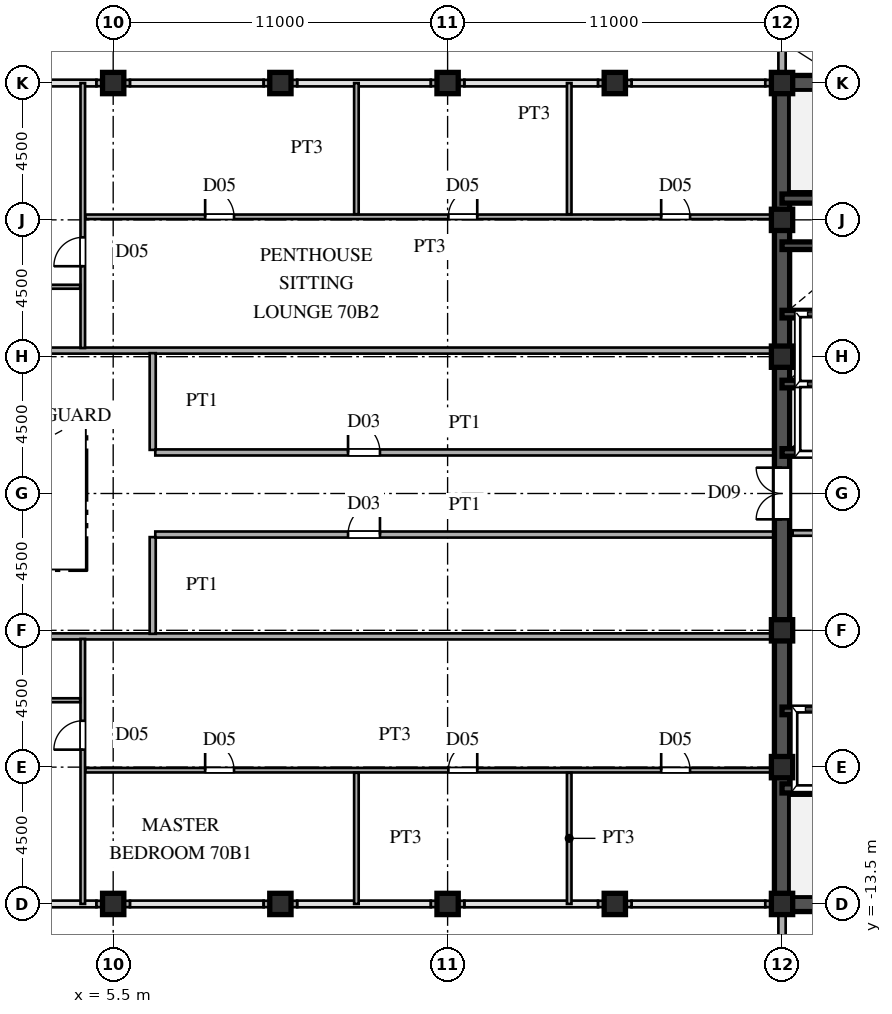
"""IFC4 building model, lengths in metres.
Left out: names, types, materials, properties, quantities, classifications, styles, units other than length and angle.
Written with IfcOpenShell. Run it as: python <this file> out.ifc"""

import sys

from ifc_helpers import new_model, si_unit, direction, frame, frame_2d, origin, origin_2d, place, context, subcontext, project, spatial, rectangle, hollow_rectangle, extrude, source, transform, mapped, element, fill, save


model = new_model("IFC4")
c1 = context("Model", 3, precision=1e-05, world=origin(), true_north=direction((0.0, 1.0)))
c2 = subcontext(c1, "Body", "Model", "MODEL_VIEW")
j1 = project(units=[si_unit("LENGTHUNIT", "METRE"), si_unit("PLANEANGLEUNIT", "RADIAN")], contexts=[c1])
p1 = place(None, origin())
s1 = spatial("IfcSite", under=j1, at=p1, CompositionType="ELEMENT")
p2 = place(p1, origin())
s2 = spatial("IfcBuilding", under=s1, at=p2, CompositionType="ELEMENT")
p3 = place(p2, frame((0.0, 0.0, 265.65)))
s3 = spatial("IfcBuildingStorey", under=s2, at=p3, CompositionType="ELEMENT", Elevation=265.65)
m1 = source(origin(), c2, "Body", "SweptSolid", [
    extrude(hollow_rectangle(XDim=0.7, YDim=0.7, WallThickness=0.03, at=origin_2d()), origin(), (0.0, 0.0, 1.0), 3.75),
])
for number, where, z_axis, x_axis in (
    (1, (27.5, -13.5, 0.0), (0.0, 0.0, 1.0), (1.0, 0.0, 0.0)),
    (2, (27.5, -9.0, 0.0), (0.0, 0.0, 1.0), (1.0, 0.0, 0.0)),
    (3, (27.5, -4.5, 0.0), (0.0, 0.0, 1.0), (1.0, 0.0, 0.0)),
    (4, (27.5, 4.5, 0.0), (0.0, 0.0, 1.0), (1.0, 0.0, 0.0)),
    (5, (27.5, 9.0, 0.0), (0.0, 0.0, 1.0), (1.0, 0.0, 0.0)),
    (6, (27.5, 13.5, 0.0), (0.0, 0.0, 1.0), (1.0, 0.0, 0.0)),
    (7, (5.5, -13.5, 0.0), (0.0, 0.0, 1.0), (1.0, 0.0, 0.0)),
    (8, (5.5, 13.5, 0.0), (0.0, 0.0, 1.0), (1.0, 0.0, 0.0)),
    (9, (11.0, -13.5, 0.0), (0.0, 0.0, 1.0), (1.0, 0.0, 0.0)),
    (10, (11.0, 13.5, 0.0), (0.0, 0.0, 1.0), (1.0, 0.0, 0.0)),
    (11, (16.5, -13.5, 0.0), (0.0, 0.0, 1.0), (1.0, 0.0, 0.0)),
    (12, (16.5, 13.5, 0.0), (0.0, 0.0, 1.0), (1.0, 0.0, 0.0)),
    (13, (22.0, -13.5, 0.0), (0.0, 0.0, 1.0), (1.0, 0.0, 0.0)),
    (14, (22.0, 13.5, 0.0), (0.0, 0.0, 1.0), (1.0, 0.0, 0.0)),
):
    element("IfcColumn", number, at=place(p3, frame(where, z_axis=z_axis, x_axis=x_axis)), inside=s3, PredefinedType="COLUMN", context=c2, shape_type="MappedRepresentation", body=[
        mapped(m1, transform((0.0, 0.0, 0.0), scale=1.0)),
    ])
p4 = place(p3, frame((27.5, -15.98, 0.0), z_axis=(0.0, 0.0, 1.0), x_axis=(0.0, 1.0, 0.0)))
e15 = element("IfcWall", 15, at=p4, inside=s3, PredefinedType="SOLIDWALL", context=c2, shape_type="SweptSolid", body=[
    extrude(rectangle(XDim=1.605, YDim=0.24, at=frame_2d((0.803, 0.0))), origin(), (0.0, 0.0, 1.0), 3.49),
])
for number, where, z_axis, x_axis in (
    (16, (27.5, -14.375, 0.0), (0.0, 0.0, 1.0), (0.0, 1.0, 0.0)),
    (17, (27.5, 13.755, 0.0), (0.0, 0.0, 1.0), (0.0, 1.0, 0.0)),
):
    element("IfcWall", number, at=place(p3, frame(where, z_axis=z_axis, x_axis=x_axis)), inside=s3, PredefinedType="SOLIDWALL", context=c2, shape_type="SweptSolid", body=[
        extrude(rectangle(XDim=0.62, YDim=0.24, at=frame_2d((0.31, 0.0))), origin(), (0.0, 0.0, 1.0), 2.99),
    ])
p5 = place(p3, frame((27.5, 14.375, 0.0), z_axis=(0.0, 0.0, 1.0), x_axis=(0.0, 1.0, 0.0)))
e18 = element("IfcWall", 18, at=p5, inside=s3, PredefinedType="SOLIDWALL", context=c2, shape_type="SweptSolid", body=[
    extrude(rectangle(XDim=1.605, YDim=0.24, at=frame_2d((0.803, 0.0))), origin(), (0.0, 0.0, 1.0), 3.49),
])
for number, where, z_axis, x_axis in (
    (19, (4.95, -13.5, 0.0), (0.0, 0.0, 1.0), (1.0, 0.0, 0.0)),
    (20, (4.95, 13.5, 0.0), (0.0, 0.0, 1.0), (1.0, 0.0, 0.0)),
    (21, (10.45, -13.5, 0.0), (0.0, 0.0, 1.0), (1.0, 0.0, 0.0)),
    (22, (10.45, 13.5, 0.0), (0.0, 0.0, 1.0), (1.0, 0.0, 0.0)),
    (23, (15.95, -13.5, 0.0), (0.0, 0.0, 1.0), (1.0, 0.0, 0.0)),
    (24, (15.95, 13.5, 0.0), (0.0, 0.0, 1.0), (1.0, 0.0, 0.0)),
    (25, (21.45, -13.5, 0.0), (0.0, 0.0, 1.0), (1.0, 0.0, 0.0)),
    (26, (21.45, 13.5, 0.0), (0.0, 0.0, 1.0), (1.0, 0.0, 0.0)),
):
    element("IfcWall", number, at=place(p3, frame(where, z_axis=z_axis, x_axis=x_axis)), inside=s3, PredefinedType="SOLIDWALL", context=c2, shape_type="SweptSolid", body=[
        extrude(rectangle(XDim=1.1, YDim=0.21, at=frame_2d((0.55, 0.0))), origin(), (0.0, 0.0, 1.0), 2.99),
    ])
for number, where, z_axis, x_axis in (
    (27, (26.95, -13.5, 0.0), (0.0, 0.0, 1.0), (1.0, 0.0, 0.0)),
    (28, (26.95, 13.5, 0.0), (0.0, 0.0, 1.0), (1.0, 0.0, 0.0)),
):
    element("IfcWall", number, at=place(p3, frame(where, z_axis=z_axis, x_axis=x_axis)), inside=s3, PredefinedType="SOLIDWALL", context=c2, shape_type="SweptSolid", body=[
        extrude(rectangle(XDim=0.54, YDim=0.21, at=frame_2d((0.27, 0.0))), origin(), (0.0, 0.0, 1.0), 2.99),
    ])
for number, where, z_axis, x_axis in (
    (29, (27.5, -13.5, 0.0), (0.0, 0.0, 1.0), (0.0, 1.0, 0.0)),
    (30, (27.5, 1.3, 0.0), (0.0, 0.0, 1.0), (0.0, 1.0, 0.0)),
):
    element("IfcWall", number, at=place(p3, frame(where, z_axis=z_axis, x_axis=x_axis)), inside=s3, PredefinedType="SHEAR", context=c2, shape_type="SweptSolid", body=[
        extrude(rectangle(XDim=12.2, YDim=0.5, at=frame_2d((6.1, 0.0))), origin(), (0.0, 0.0, 1.0), 3.49),
    ])
p6 = place(p3, frame((27.5, -1.3, 0.0), z_axis=(0.0, 0.0, 1.0), x_axis=(0.0, 1.0, 0.0)))
e31 = element("IfcWall", 31, at=p6, inside=s3, PredefinedType="SHEAR", context=c2, shape_type="SweptSolid", body=[
    extrude(rectangle(XDim=2.6, YDim=0.5, at=frame_2d((1.3, 0.0))), origin(), (0.0, 0.0, 1.0), 3.49),
])
p7 = place(p6, frame((0.45, 0.0, 0.0)))
e32 = element("IfcOpeningElement", 32, at=p7, cuts=e31, PredefinedType="OPENING", context=c2, shape_type="SweptSolid", body=[
    extrude(rectangle(XDim=1.7, YDim=2.35, at=frame_2d((0.85, 1.175))), frame((0.0, 0.26, 0.0), z_axis=(0.0, -1.0, 0.0), x_axis=(1.0, 0.0, 0.0)), (0.0, 0.0, 1.0), 0.52),
])
for number, where, z_axis, x_axis in (
    (33, (27.5, -13.5, 0.0), (0.0, 0.0, 1.0), (1.0, 0.0, 0.0)),
    (34, (27.5, 13.5, 0.0), (0.0, 0.0, 1.0), (1.0, 0.0, 0.0)),
):
    element("IfcWall", number, at=place(p3, frame(where, z_axis=z_axis, x_axis=x_axis)), inside=s3, PredefinedType="SHEAR", context=c2, shape_type="SweptSolid", body=[
        extrude(rectangle(XDim=9.0, YDim=0.5, at=frame_2d((4.5, 0.0))), origin(), (0.0, 0.0, 1.0), 3.49),
    ])
p8 = place(p3, frame((27.5, -9.7, 0.0), z_axis=(0.0, 0.0, 1.0), x_axis=(1.0, 0.0, 0.0)))
e35 = element("IfcWall", 35, at=p8, inside=s3, PredefinedType="SHEAR", context=c2, shape_type="SweptSolid", body=[
    extrude(rectangle(XDim=9.0, YDim=0.3, at=frame_2d((4.5, 0.0))), origin(), (0.0, 0.0, 1.0), 3.49),
])
p9 = place(p8, frame((7.3, 0.0, 0.0)))
e36 = element("IfcOpeningElement", 36, at=p9, cuts=e35, PredefinedType="OPENING", context=c2, shape_type="SweptSolid", body=[
    extrude(rectangle(XDim=1.1, YDim=2.2, at=frame_2d((0.55, 1.1))), frame((0.0, 0.16, 0.0), z_axis=(0.0, -1.0, 0.0), x_axis=(1.0, 0.0, 0.0)), (0.0, 0.0, 1.0), 0.32),
])
p10 = place(p3, frame((27.5, 9.7, 0.0), z_axis=(0.0, 0.0, 1.0), x_axis=(1.0, 0.0, 0.0)))
e37 = element("IfcWall", 37, at=p10, inside=s3, PredefinedType="SHEAR", context=c2, shape_type="SweptSolid", body=[
    extrude(rectangle(XDim=9.0, YDim=0.3, at=frame_2d((4.5, 0.0))), origin(), (0.0, 0.0, 1.0), 3.49),
])
p11 = place(p10, frame((7.3, 0.0, 0.0)))
e38 = element("IfcOpeningElement", 38, at=p11, cuts=e37, PredefinedType="OPENING", context=c2, shape_type="SweptSolid", body=[
    extrude(rectangle(XDim=1.1, YDim=2.2, at=frame_2d((0.55, 1.1))), frame((0.0, 0.16, 0.0), z_axis=(0.0, -1.0, 0.0), x_axis=(1.0, 0.0, 0.0)), (0.0, 0.0, 1.0), 0.32),
])
for number, where, z_axis, x_axis in (
    (39, (27.5, -7.15, 0.0), (0.0, 0.0, 1.0), (1.0, 0.0, 0.0)),
    (40, (27.5, 1.35, 0.0), (0.0, 0.0, 1.0), (1.0, 0.0, 0.0)),
    (41, (27.5, 3.6, 0.0), (0.0, 0.0, 1.0), (1.0, 0.0, 0.0)),
    (42, (27.5, 5.9, 0.0), (0.0, 0.0, 1.0), (1.0, 0.0, 0.0)),
    (43, (27.5, 8.15, 0.0), (0.0, 0.0, 1.0), (1.0, 0.0, 0.0)),
):
    element("IfcWall", number, at=place(p3, frame(where, z_axis=z_axis, x_axis=x_axis)), inside=s3, PredefinedType="SHEAR", context=c2, shape_type="SweptSolid", body=[
        extrude(rectangle(XDim=2.8, YDim=0.25, at=frame_2d((1.4, 0.0))), origin(), (0.0, 0.0, 1.0), 3.49),
    ])
p12 = place(p3, frame((27.85, -1.3, 0.0), z_axis=(0.0, 0.0, 1.0), x_axis=(1.0, 0.0, 0.0)))
e44 = element("IfcWall", 44, at=p12, inside=s3, PredefinedType="PARTITIONING", context=c2, shape_type="SweptSolid", body=[
    extrude(rectangle(XDim=5.17, YDim=0.18, at=frame_2d((2.585, 0.0))), origin(), (0.0, 0.0, 1.0), 3.49),
])
p13 = place(p12, frame((2.01, 0.0, 0.0)))
e45 = element("IfcOpeningElement", 45, at=p13, cuts=e44, PredefinedType="OPENING", context=c2, shape_type="SweptSolid", body=[
    extrude(rectangle(XDim=1.15, YDim=2.2, at=frame_2d((0.575, 1.1))), frame((0.0, 0.1, 0.0), z_axis=(0.0, -1.0, 0.0), x_axis=(1.0, 0.0, 0.0)), (0.0, 0.0, 1.0), 0.2),
])
p14 = place(p3, frame((4.585, -9.1, 0.0), z_axis=(0.0, 0.0, 1.0), x_axis=(1.0, 0.0, 0.0)))
e46 = element("IfcWall", 46, at=p14, inside=s3, PredefinedType="PARTITIONING", context=c2, shape_type="SweptSolid", body=[
    extrude(rectangle(XDim=22.66, YDim=0.15, at=frame_2d((11.33, 0.0))), origin(), (0.0, 0.0, 1.0), 3.49),
])
p15 = place(p14, frame((3.94, 0.0, 0.0)))
e47 = element("IfcOpeningElement", 47, at=p15, cuts=e46, PredefinedType="OPENING", context=c2, shape_type="SweptSolid", body=[
    extrude(rectangle(XDim=0.95, YDim=2.15, at=frame_2d((0.475, 1.075))), frame((0.0, 0.085, 0.0), z_axis=(0.0, -1.0, 0.0), x_axis=(1.0, 0.0, 0.0)), (0.0, 0.0, 1.0), 0.17),
])
p16 = place(p14, frame((11.94, 0.0, 0.0)))
e48 = element("IfcOpeningElement", 48, at=p16, cuts=e46, PredefinedType="OPENING", context=c2, shape_type="SweptSolid", body=[
    extrude(rectangle(XDim=0.95, YDim=2.15, at=frame_2d((0.475, 1.075))), frame((0.0, 0.085, 0.0), z_axis=(0.0, -1.0, 0.0), x_axis=(1.0, 0.0, 0.0)), (0.0, 0.0, 1.0), 0.17),
])
p17 = place(p14, frame((18.94, 0.0, 0.0)))
e49 = element("IfcOpeningElement", 49, at=p17, cuts=e46, PredefinedType="OPENING", context=c2, shape_type="SweptSolid", body=[
    extrude(rectangle(XDim=0.95, YDim=2.15, at=frame_2d((0.475, 1.075))), frame((0.0, 0.085, 0.0), z_axis=(0.0, -1.0, 0.0), x_axis=(1.0, 0.0, 0.0)), (0.0, 0.0, 1.0), 0.17),
])
p18 = place(p3, frame((-0.915, -6.8, 0.0), z_axis=(0.0, 0.0, 1.0), x_axis=(1.0, 0.0, 0.0)))
e50 = element("IfcWall", 50, at=p18, inside=s3, PredefinedType="PARTITIONING", context=c2, shape_type="SweptSolid", body=[
    extrude(rectangle(XDim=5.33, YDim=0.13, at=frame_2d((2.665, 0.0))), origin(), (0.0, 0.0, 1.0), 3.14),
])
p19 = place(p3, frame((-27.245, -4.7, 0.0), z_axis=(0.0, 0.0, 1.0), x_axis=(1.0, 0.0, 0.0)))
e51 = element("IfcWall", 51, at=p19, inside=s3, PredefinedType="PARTITIONING", context=c2, shape_type="SweptSolid", body=[
    extrude(rectangle(XDim=54.49, YDim=0.2, at=frame_2d((27.245, 0.0))), origin(), (0.0, 0.0, 1.0), 3.49),
])
p20 = place(p19, frame((22.47, 0.0, 0.0)))
e52 = element("IfcOpeningElement", 52, at=p20, cuts=e51, PredefinedType="OPENING", context=c2, shape_type="SweptSolid", body=[
    extrude(rectangle(XDim=1.05, YDim=2.25, at=frame_2d((0.525, 1.125))), frame((0.0, 0.11, 0.0), z_axis=(0.0, -1.0, 0.0), x_axis=(1.0, 0.0, 0.0)), (0.0, 0.0, 1.0), 0.22),
])
p21 = place(p3, frame((6.885, -1.35, 0.0), z_axis=(0.0, 0.0, 1.0), x_axis=(1.0, 0.0, 0.0)))
e53 = element("IfcWall", 53, at=p21, inside=s3, PredefinedType="PARTITIONING", context=c2, shape_type="SweptSolid", body=[
    extrude(rectangle(XDim=20.36, YDim=0.2, at=frame_2d((10.18, 0.0))), origin(), (0.0, 0.0, 1.0), 3.49),
])
p22 = place(p21, frame((6.34, 0.0, 0.0)))
e54 = element("IfcOpeningElement", 54, at=p22, cuts=e53, PredefinedType="OPENING", context=c2, shape_type="SweptSolid", body=[
    extrude(rectangle(XDim=1.05, YDim=2.25, at=frame_2d((0.525, 1.125))), frame((0.0, 0.11, 0.0), z_axis=(0.0, -1.0, 0.0), x_axis=(1.0, 0.0, 0.0)), (0.0, 0.0, 1.0), 0.22),
])
p23 = place(p3, frame((6.885, 1.35, 0.0), z_axis=(0.0, 0.0, 1.0), x_axis=(1.0, 0.0, 0.0)))
e55 = element("IfcWall", 55, at=p23, inside=s3, PredefinedType="PARTITIONING", context=c2, shape_type="SweptSolid", body=[
    extrude(rectangle(XDim=20.36, YDim=0.2, at=frame_2d((10.18, 0.0))), origin(), (0.0, 0.0, 1.0), 3.49),
])
p24 = place(p23, frame((6.34, 0.0, 0.0)))
e56 = element("IfcOpeningElement", 56, at=p24, cuts=e55, PredefinedType="OPENING", context=c2, shape_type="SweptSolid", body=[
    extrude(rectangle(XDim=1.05, YDim=2.25, at=frame_2d((0.525, 1.125))), frame((0.0, 0.11, 0.0), z_axis=(0.0, -1.0, 0.0), x_axis=(1.0, 0.0, 0.0)), (0.0, 0.0, 1.0), 0.22),
])
p25 = place(p3, frame((-27.245, 4.7, 0.0), z_axis=(0.0, 0.0, 1.0), x_axis=(1.0, 0.0, 0.0)))
e57 = element("IfcWall", 57, at=p25, inside=s3, PredefinedType="PARTITIONING", context=c2, shape_type="SweptSolid", body=[
    extrude(rectangle(XDim=54.49, YDim=0.2, at=frame_2d((27.245, 0.0))), origin(), (0.0, 0.0, 1.0), 3.49),
])
p26 = place(p25, frame((22.47, 0.0, 0.0)))
e58 = element("IfcOpeningElement", 58, at=p26, cuts=e57, PredefinedType="OPENING", context=c2, shape_type="SweptSolid", body=[
    extrude(rectangle(XDim=1.05, YDim=2.25, at=frame_2d((0.525, 1.125))), frame((0.0, 0.11, 0.0), z_axis=(0.0, -1.0, 0.0), x_axis=(1.0, 0.0, 0.0)), (0.0, 0.0, 1.0), 0.22),
])
p27 = place(p3, frame((-0.915, 6.8, 0.0), z_axis=(0.0, 0.0, 1.0), x_axis=(1.0, 0.0, 0.0)))
e59 = element("IfcWall", 59, at=p27, inside=s3, PredefinedType="PARTITIONING", context=c2, shape_type="SweptSolid", body=[
    extrude(rectangle(XDim=5.33, YDim=0.13, at=frame_2d((2.665, 0.0))), origin(), (0.0, 0.0, 1.0), 3.14),
])
p28 = place(p3, frame((4.585, 9.1, 0.0), z_axis=(0.0, 0.0, 1.0), x_axis=(1.0, 0.0, 0.0)))
e60 = element("IfcWall", 60, at=p28, inside=s3, PredefinedType="PARTITIONING", context=c2, shape_type="SweptSolid", body=[
    extrude(rectangle(XDim=22.66, YDim=0.15, at=frame_2d((11.33, 0.0))), origin(), (0.0, 0.0, 1.0), 3.49),
])
p29 = place(p28, frame((3.94, 0.0, 0.0)))
e61 = element("IfcOpeningElement", 61, at=p29, cuts=e60, PredefinedType="OPENING", context=c2, shape_type="SweptSolid", body=[
    extrude(rectangle(XDim=0.95, YDim=2.15, at=frame_2d((0.475, 1.075))), frame((0.0, 0.085, 0.0), z_axis=(0.0, -1.0, 0.0), x_axis=(1.0, 0.0, 0.0)), (0.0, 0.0, 1.0), 0.17),
])
p30 = place(p28, frame((11.94, 0.0, 0.0)))
e62 = element("IfcOpeningElement", 62, at=p30, cuts=e60, PredefinedType="OPENING", context=c2, shape_type="SweptSolid", body=[
    extrude(rectangle(XDim=0.95, YDim=2.15, at=frame_2d((0.475, 1.075))), frame((0.0, 0.085, 0.0), z_axis=(0.0, -1.0, 0.0), x_axis=(1.0, 0.0, 0.0)), (0.0, 0.0, 1.0), 0.17),
])
p31 = place(p28, frame((18.94, 0.0, 0.0)))
e63 = element("IfcOpeningElement", 63, at=p31, cuts=e60, PredefinedType="OPENING", context=c2, shape_type="SweptSolid", body=[
    extrude(rectangle(XDim=0.95, YDim=2.15, at=frame_2d((0.475, 1.075))), frame((0.0, 0.085, 0.0), z_axis=(0.0, -1.0, 0.0), x_axis=(1.0, 0.0, 0.0)), (0.0, 0.0, 1.0), 0.17),
])
p32 = place(p3, frame((4.5, -13.5, 0.0), z_axis=(0.0, 0.0, 1.0), x_axis=(0.0, 1.0, 0.0)))
e64 = element("IfcWall", 64, at=p32, inside=s3, PredefinedType="PARTITIONING", context=c2, shape_type="SweptSolid", body=[
    extrude(rectangle(XDim=8.715, YDim=0.15, at=frame_2d((4.357, 0.0))), origin(), (0.0, 0.0, 1.0), 3.49),
])
p33 = place(p32, frame((5.075, 0.0, 0.0)))
e65 = element("IfcOpeningElement", 65, at=p33, cuts=e64, PredefinedType="OPENING", context=c2, shape_type="SweptSolid", body=[
    extrude(rectangle(XDim=0.95, YDim=2.15, at=frame_2d((0.475, 1.075))), frame((0.0, 0.085, 0.0), z_axis=(0.0, -1.0, 0.0), x_axis=(1.0, 0.0, 0.0)), (0.0, 0.0, 1.0), 0.17),
])
p34 = place(p3, frame((4.5, 4.785, 0.0), z_axis=(0.0, 0.0, 1.0), x_axis=(0.0, 1.0, 0.0)))
e66 = element("IfcWall", 66, at=p34, inside=s3, PredefinedType="PARTITIONING", context=c2, shape_type="SweptSolid", body=[
    extrude(rectangle(XDim=8.715, YDim=0.15, at=frame_2d((4.357, 0.0))), origin(), (0.0, 0.0, 1.0), 3.49),
])
p35 = place(p34, frame((2.69, 0.0, 0.0)))
e67 = element("IfcOpeningElement", 67, at=p35, cuts=e66, PredefinedType="OPENING", context=c2, shape_type="SweptSolid", body=[
    extrude(rectangle(XDim=0.95, YDim=2.15, at=frame_2d((0.475, 1.075))), frame((0.0, 0.085, 0.0), z_axis=(0.0, -1.0, 0.0), x_axis=(1.0, 0.0, 0.0)), (0.0, 0.0, 1.0), 0.17),
])
for number, where, z_axis, x_axis in (
    (68, (6.8, -4.615, 0.0), (0.0, 0.0, 1.0), (0.0, 1.0, 0.0)),
    (69, (6.8, 1.435, 0.0), (0.0, 0.0, 1.0), (0.0, 1.0, 0.0)),
):
    element("IfcWall", number, at=place(p3, frame(where, z_axis=z_axis, x_axis=x_axis)), inside=s3, PredefinedType="PARTITIONING", context=c2, shape_type="SweptSolid", body=[
        extrude(rectangle(XDim=3.18, YDim=0.2, at=frame_2d((1.59, 0.0))), origin(), (0.0, 0.0, 1.0), 3.49),
    ])
for number, where, z_axis, x_axis in (
    (70, (13.5, -13.5, 0.0), (0.0, 0.0, 1.0), (0.0, 1.0, 0.0)),
    (71, (13.5, 9.185, 0.0), (0.0, 0.0, 1.0), (0.0, 1.0, 0.0)),
    (72, (20.5, -13.5, 0.0), (0.0, 0.0, 1.0), (0.0, 1.0, 0.0)),
    (73, (20.5, 9.185, 0.0), (0.0, 0.0, 1.0), (0.0, 1.0, 0.0)),
):
    element("IfcWall", number, at=place(p3, frame(where, z_axis=z_axis, x_axis=x_axis)), inside=s3, PredefinedType="PARTITIONING", context=c2, shape_type="SweptSolid", body=[
        extrude(rectangle(XDim=4.315, YDim=0.15, at=frame_2d((2.157, 0.0))), origin(), (0.0, 0.0, 1.0), 3.49),
    ])
m2 = source(origin(), c2, "Body", "SweptSolid", [
    extrude(rectangle(XDim=1.7, YDim=2.35, at=frame_2d((0.85, 1.175))), frame((0.0, 0.025, 0.0), z_axis=(0.0, -1.0, 0.0), x_axis=(1.0, 0.0, 0.0)), (0.0, 0.0, 1.0), 0.05),
])
p36 = place(p7, origin())
e74 = element("IfcDoor", 74, at=p36, inside=s3, OperationType="DOUBLE_SWING_LEFT", PredefinedType="DOOR", context=c2, shape_type="MappedRepresentation", body=[
    mapped(m2, transform((0.0, 0.0, 0.0), scale=1.0)),
])
fill(e32, e74)
m3 = source(origin(), c2, "Body", "SweptSolid", [
    extrude(rectangle(XDim=0.95, YDim=2.15, at=frame_2d((0.475, 1.075))), frame((0.0, 0.025, 0.0), z_axis=(0.0, -1.0, 0.0), x_axis=(1.0, 0.0, 0.0)), (0.0, 0.0, 1.0), 0.05),
])
p37 = place(p15, origin())
e75 = element("IfcDoor", 75, at=p37, inside=s3, OperationType="SINGLE_SWING_LEFT", PredefinedType="DOOR", context=c2, shape_type="MappedRepresentation", body=[
    mapped(m3, transform((0.0, 0.0, 0.0), scale=1.0)),
])
fill(e47, e75)
p38 = place(p16, origin())
e76 = element("IfcDoor", 76, at=p38, inside=s3, OperationType="SINGLE_SWING_RIGHT", PredefinedType="DOOR", context=c2, shape_type="MappedRepresentation", body=[
    mapped(m3, transform((0.0, 0.0, 0.0), scale=1.0)),
])
fill(e48, e76)
p39 = place(p17, origin())
e77 = element("IfcDoor", 77, at=p39, inside=s3, OperationType="SINGLE_SWING_LEFT", PredefinedType="DOOR", context=c2, shape_type="MappedRepresentation", body=[
    mapped(m3, transform((0.0, 0.0, 0.0), scale=1.0)),
])
fill(e49, e77)
m4 = source(origin(), c2, "Body", "SweptSolid", [
    extrude(rectangle(XDim=1.05, YDim=2.25, at=frame_2d((0.525, 1.125))), frame((0.0, 0.025, 0.0), z_axis=(0.0, -1.0, 0.0), x_axis=(1.0, 0.0, 0.0)), (0.0, 0.0, 1.0), 0.05),
])
p40 = place(p22, origin())
e78 = element("IfcDoor", 78, at=p40, inside=s3, OperationType="SINGLE_SWING_RIGHT", PredefinedType="DOOR", context=c2, shape_type="MappedRepresentation", body=[
    mapped(m4, transform((0.0, 0.0, 0.0), scale=1.0)),
])
fill(e54, e78)
p41 = place(p24, origin())
e79 = element("IfcDoor", 79, at=p41, inside=s3, OperationType="SINGLE_SWING_LEFT", PredefinedType="DOOR", context=c2, shape_type="MappedRepresentation", body=[
    mapped(m4, transform((0.0, 0.0, 0.0), scale=1.0)),
])
fill(e56, e79)
p42 = place(p29, origin())
e80 = element("IfcDoor", 80, at=p42, inside=s3, OperationType="SINGLE_SWING_LEFT", PredefinedType="DOOR", context=c2, shape_type="MappedRepresentation", body=[
    mapped(m3, transform((0.0, 0.0, 0.0), scale=1.0)),
])
fill(e61, e80)
p43 = place(p30, origin())
e81 = element("IfcDoor", 81, at=p43, inside=s3, OperationType="SINGLE_SWING_RIGHT", PredefinedType="DOOR", context=c2, shape_type="MappedRepresentation", body=[
    mapped(m3, transform((0.0, 0.0, 0.0), scale=1.0)),
])
fill(e62, e81)
p44 = place(p31, origin())
e82 = element("IfcDoor", 82, at=p44, inside=s3, OperationType="SINGLE_SWING_LEFT", PredefinedType="DOOR", context=c2, shape_type="MappedRepresentation", body=[
    mapped(m3, transform((0.0, 0.0, 0.0), scale=1.0)),
])
fill(e63, e82)
p45 = place(p33, origin())
e83 = element("IfcDoor", 83, at=p45, inside=s3, OperationType="SINGLE_SWING_LEFT", PredefinedType="DOOR", context=c2, shape_type="MappedRepresentation", body=[
    mapped(m3, transform((0.0, 0.0, 0.0), scale=1.0)),
])
fill(e65, e83)
p46 = place(p35, origin())
e84 = element("IfcDoor", 84, at=p46, inside=s3, OperationType="SINGLE_SWING_LEFT", PredefinedType="DOOR", context=c2, shape_type="MappedRepresentation", body=[
    mapped(m3, transform((0.0, 0.0, 0.0), scale=1.0)),
])
fill(e67, e84)
save(model, sys.argv[1])
